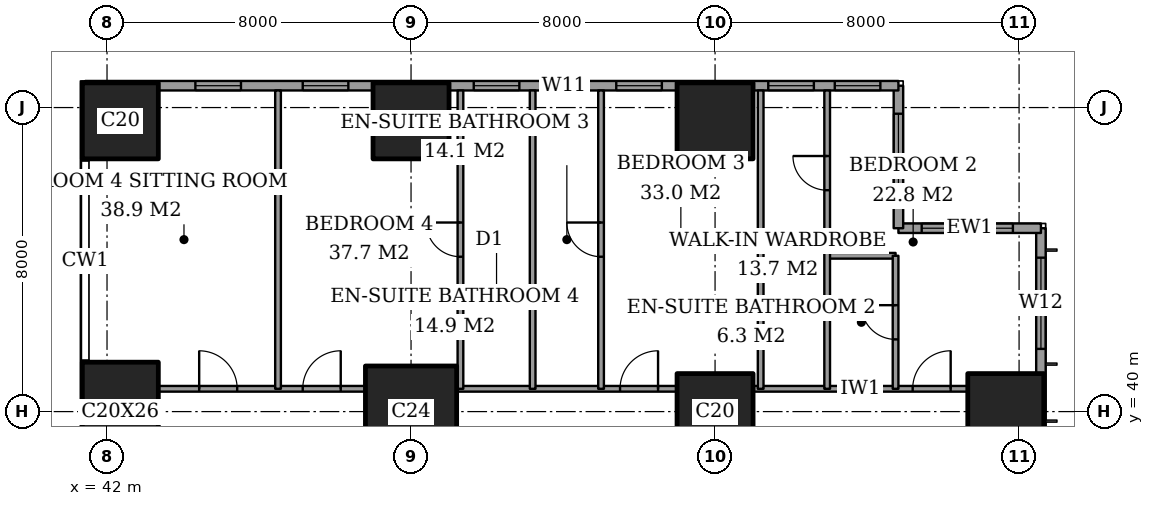
"""IFC4 building model, lengths in metres.
Left out: names, types, materials, properties, quantities, classifications, styles, units other than length and angle.
Written with IfcOpenShell. Run it as: python <this file> out.ifc"""

import sys

from ifc_helpers import new_model, si_unit, direction, frame, frame_2d, origin, origin_2d, place, context, subcontext, project, spatial, rectangle, extrude, element, fill, save


model = new_model("IFC4")
c1 = context("Model", 3, precision=1e-05, world=origin(), true_north=direction((0.0, 1.0)))
c2 = subcontext(c1, "Body", "Model", "MODEL_VIEW")
j1 = project(units=[si_unit("LENGTHUNIT", "METRE"), si_unit("PLANEANGLEUNIT", "RADIAN")], contexts=[c1])
p1 = place(None, origin())
s1 = spatial("IfcSite", under=j1, at=p1, CompositionType="ELEMENT")
p2 = place(p1, origin())
s2 = spatial("IfcBuilding", under=s1, at=p2, CompositionType="ELEMENT")
p3 = place(p2, frame((0.0, 0.0, 135.8)))
s3 = spatial("IfcBuildingStorey", under=s2, at=p3, CompositionType="ELEMENT", Elevation=135.8)
p4 = place(p3, frame((42.35, 40.0, 0.0), z_axis=(0.0, 0.0, 1.0), x_axis=(1.0, 0.0, 0.0)))
e1 = element("IfcColumn", 1, at=p4, inside=s3, PredefinedType="COLUMN", context=c2, shape_type="SweptSolid", body=[
    extrude(rectangle(XDim=2.0, YDim=2.6, at=origin_2d()), origin(), (0.0, 0.0, 1.0), 3.6),
])
p5 = place(p3, frame((42.35, 47.65, 0.0), z_axis=(0.0, 0.0, 1.0), x_axis=(1.0, 0.0, 0.0)))
e2 = element("IfcColumn", 2, at=p5, inside=s3, PredefinedType="COLUMN", context=c2, shape_type="SweptSolid", body=[
    extrude(rectangle(XDim=2.0, YDim=2.0, at=origin_2d()), origin(), (0.0, 0.0, 1.0), 3.6),
])
p6 = place(p3, frame((50.0, 40.0, 0.0), z_axis=(0.0, 0.0, 1.0), x_axis=(1.0, 0.0, 0.0)))
e3 = element("IfcColumn", 3, at=p6, inside=s3, PredefinedType="COLUMN", context=c2, shape_type="SweptSolid", body=[
    extrude(rectangle(XDim=2.4, YDim=2.4, at=origin_2d()), origin(), (0.0, 0.0, 1.0), 3.6),
])
for number, where, z_axis, x_axis in (
    (4, (50.0, 47.65, 0.0), (0.0, 0.0, 1.0), (1.0, 0.0, 0.0)),
    (5, (58.0, 40.0, 0.0), (0.0, 0.0, 1.0), (1.0, 0.0, 0.0)),
    (6, (58.0, 47.65, 0.0), (0.0, 0.0, 1.0), (1.0, 0.0, 0.0)),
    (7, (65.65, 40.0, 0.0), (0.0, 0.0, 1.0), (1.0, 0.0, 0.0)),
):
    element("IfcColumn", number, at=place(p3, frame(where, z_axis=z_axis, x_axis=x_axis)), inside=s3, PredefinedType="COLUMN", context=c2, shape_type="SweptSolid", body=[
        extrude(rectangle(XDim=2.0, YDim=2.0, at=origin_2d()), origin(), (0.0, 0.0, 1.0), 3.6),
    ])
p7 = place(p3, frame((66.575, 3.175, 0.0), z_axis=(0.0, 0.0, 1.0), x_axis=(0.0, 1.0, 0.0)))
e8 = element("IfcWall", 8, at=p7, inside=s3, PredefinedType="SOLIDWALL", context=c2, shape_type="SweptSolid", body=[
    extrude(rectangle(XDim=41.65, YDim=0.25, at=frame_2d((20.825, 0.0))), origin(), (0.0, 0.0, 1.0), 3.6),
])
p8 = place(p7, frame((0.775, 0.0, 0.4)))
e9 = element("IfcOpeningElement", 9, at=p8, cuts=e8, PredefinedType="OPENING", context=c2, shape_type="SweptSolid", body=[
    extrude(rectangle(XDim=2.4, YDim=2.2, at=frame_2d((1.2, 1.1))), frame((0.0, 0.135, 0.0), z_axis=(0.0, -1.0, 0.0), x_axis=(1.0, 0.0, 0.0)), (0.0, 0.0, 1.0), 0.27),
])
p9 = place(p7, frame((6.1, 0.0, 0.4)))
e10 = element("IfcOpeningElement", 10, at=p9, cuts=e8, PredefinedType="OPENING", context=c2, shape_type="SweptSolid", body=[
    extrude(rectangle(XDim=1.2, YDim=2.2, at=frame_2d((0.6, 1.1))), frame((0.0, 0.135, 0.0), z_axis=(0.0, -1.0, 0.0), x_axis=(1.0, 0.0, 0.0)), (0.0, 0.0, 1.0), 0.27),
])
p10 = place(p7, frame((8.275, 0.0, 0.4)))
e11 = element("IfcOpeningElement", 11, at=p10, cuts=e8, PredefinedType="OPENING", context=c2, shape_type="SweptSolid", body=[
    extrude(rectangle(XDim=2.4, YDim=2.2, at=frame_2d((1.2, 1.1))), frame((0.0, 0.135, 0.0), z_axis=(0.0, -1.0, 0.0), x_axis=(1.0, 0.0, 0.0)), (0.0, 0.0, 1.0), 0.27),
])
p11 = place(p7, frame((15.775, 0.0, 0.4)))
e12 = element("IfcOpeningElement", 12, at=p11, cuts=e8, PredefinedType="OPENING", context=c2, shape_type="SweptSolid", body=[
    extrude(rectangle(XDim=2.4, YDim=2.2, at=frame_2d((1.2, 1.1))), frame((0.0, 0.135, 0.0), z_axis=(0.0, -1.0, 0.0), x_axis=(1.0, 0.0, 0.0)), (0.0, 0.0, 1.0), 0.27),
])
p12 = place(p7, frame((23.475, 0.0, 0.4)))
e13 = element("IfcOpeningElement", 13, at=p12, cuts=e8, PredefinedType="OPENING", context=c2, shape_type="SweptSolid", body=[
    extrude(rectangle(XDim=2.4, YDim=2.2, at=frame_2d((1.2, 1.1))), frame((0.0, 0.135, 0.0), z_axis=(0.0, -1.0, 0.0), x_axis=(1.0, 0.0, 0.0)), (0.0, 0.0, 1.0), 0.27),
])
p13 = place(p7, frame((30.975, 0.0, 0.4)))
e14 = element("IfcOpeningElement", 14, at=p13, cuts=e8, PredefinedType="OPENING", context=c2, shape_type="SweptSolid", body=[
    extrude(rectangle(XDim=2.4, YDim=2.2, at=frame_2d((1.2, 1.1))), frame((0.0, 0.135, 0.0), z_axis=(0.0, -1.0, 0.0), x_axis=(1.0, 0.0, 0.0)), (0.0, 0.0, 1.0), 0.27),
])
p14 = place(p7, frame((34.5, 0.0, 0.4)))
e15 = element("IfcOpeningElement", 15, at=p14, cuts=e8, PredefinedType="OPENING", context=c2, shape_type="SweptSolid", body=[
    extrude(rectangle(XDim=1.2, YDim=2.2, at=frame_2d((0.6, 1.1))), frame((0.0, 0.135, 0.0), z_axis=(0.0, -1.0, 0.0), x_axis=(1.0, 0.0, 0.0)), (0.0, 0.0, 1.0), 0.27),
])
p15 = place(p7, frame((38.475, 0.0, 0.4)))
e16 = element("IfcOpeningElement", 16, at=p15, cuts=e8, PredefinedType="OPENING", context=c2, shape_type="SweptSolid", body=[
    extrude(rectangle(XDim=2.4, YDim=2.2, at=frame_2d((1.2, 1.1))), frame((0.0, 0.135, 0.0), z_axis=(0.0, -1.0, 0.0), x_axis=(1.0, 0.0, 0.0)), (0.0, 0.0, 1.0), 0.27),
])
p16 = place(p3, frame((66.575, 44.825, 0.0), z_axis=(0.0, 0.0, 1.0), x_axis=(-1.0, 0.0, 0.0)))
e17 = element("IfcWall", 17, at=p16, inside=s3, PredefinedType="SOLIDWALL", context=c2, shape_type="SweptSolid", body=[
    extrude(rectangle(XDim=3.75, YDim=0.25, at=frame_2d((1.875, 0.0))), origin(), (0.0, 0.0, 1.0), 3.6),
])
p17 = place(p16, frame((0.738, 0.0, 0.4)))
e18 = element("IfcOpeningElement", 18, at=p17, cuts=e17, PredefinedType="OPENING", context=c2, shape_type="SweptSolid", body=[
    extrude(rectangle(XDim=2.4, YDim=2.2, at=frame_2d((1.2, 1.1))), frame((0.0, 0.135, 0.0), z_axis=(0.0, -1.0, 0.0), x_axis=(1.0, 0.0, 0.0)), (0.0, 0.0, 1.0), 0.27),
])
p18 = place(p3, frame((62.825, 44.825, 0.0), z_axis=(0.0, 0.0, 1.0), x_axis=(0.0, 1.0, 0.0)))
e19 = element("IfcWall", 19, at=p18, inside=s3, PredefinedType="SOLIDWALL", context=c2, shape_type="SweptSolid", body=[
    extrude(rectangle(XDim=3.75, YDim=0.25, at=frame_2d((1.875, 0.0))), origin(), (0.0, 0.0, 1.0), 3.6),
])
p19 = place(p18, frame((0.613, 0.0, 0.4)))
e20 = element("IfcOpeningElement", 20, at=p19, cuts=e19, PredefinedType="OPENING", context=c2, shape_type="SweptSolid", body=[
    extrude(rectangle(XDim=2.4, YDim=2.2, at=frame_2d((1.2, 1.1))), frame((0.0, 0.135, 0.0), z_axis=(0.0, -1.0, 0.0), x_axis=(1.0, 0.0, 0.0)), (0.0, 0.0, 1.0), 0.27),
])
p20 = place(p3, frame((62.825, 48.575, 0.0), z_axis=(0.0, 0.0, 1.0), x_axis=(-1.0, 0.0, 0.0)))
e21 = element("IfcWall", 21, at=p20, inside=s3, PredefinedType="SOLIDWALL", context=c2, shape_type="SweptSolid", body=[
    extrude(rectangle(XDim=21.4, YDim=0.25, at=frame_2d((10.7, 0.0))), origin(), (0.0, 0.0, 1.0), 3.6),
])
p21 = place(p20, frame((0.475, 0.0, 0.4)))
e22 = element("IfcOpeningElement", 22, at=p21, cuts=e21, PredefinedType="OPENING", context=c2, shape_type="SweptSolid", body=[
    extrude(rectangle(XDim=1.2, YDim=2.2, at=frame_2d((0.6, 1.1))), frame((0.0, 0.135, 0.0), z_axis=(0.0, -1.0, 0.0), x_axis=(1.0, 0.0, 0.0)), (0.0, 0.0, 1.0), 0.27),
])
p22 = place(p20, frame((2.225, 0.0, 0.4)))
e23 = element("IfcOpeningElement", 23, at=p22, cuts=e21, PredefinedType="OPENING", context=c2, shape_type="SweptSolid", body=[
    extrude(rectangle(XDim=1.2, YDim=2.2, at=frame_2d((0.6, 1.1))), frame((0.0, 0.135, 0.0), z_axis=(0.0, -1.0, 0.0), x_axis=(1.0, 0.0, 0.0)), (0.0, 0.0, 1.0), 0.27),
])
p23 = place(p20, frame((6.225, 0.0, 0.4)))
e24 = element("IfcOpeningElement", 24, at=p23, cuts=e21, PredefinedType="OPENING", context=c2, shape_type="SweptSolid", body=[
    extrude(rectangle(XDim=1.2, YDim=2.2, at=frame_2d((0.6, 1.1))), frame((0.0, 0.135, 0.0), z_axis=(0.0, -1.0, 0.0), x_axis=(1.0, 0.0, 0.0)), (0.0, 0.0, 1.0), 0.27),
])
p24 = place(p20, frame((8.2, 0.0, 0.4)))
e25 = element("IfcOpeningElement", 25, at=p24, cuts=e21, PredefinedType="OPENING", context=c2, shape_type="SweptSolid", body=[
    extrude(rectangle(XDim=1.2, YDim=2.2, at=frame_2d((0.6, 1.1))), frame((0.0, 0.135, 0.0), z_axis=(0.0, -1.0, 0.0), x_axis=(1.0, 0.0, 0.0)), (0.0, 0.0, 1.0), 0.27),
])
p25 = place(p20, frame((9.975, 0.0, 0.4)))
e26 = element("IfcOpeningElement", 26, at=p25, cuts=e21, PredefinedType="OPENING", context=c2, shape_type="SweptSolid", body=[
    extrude(rectangle(XDim=1.2, YDim=2.2, at=frame_2d((0.6, 1.1))), frame((0.0, 0.135, 0.0), z_axis=(0.0, -1.0, 0.0), x_axis=(1.0, 0.0, 0.0)), (0.0, 0.0, 1.0), 0.27),
])
p26 = place(p20, frame((14.475, 0.0, 0.4)))
e27 = element("IfcOpeningElement", 27, at=p26, cuts=e21, PredefinedType="OPENING", context=c2, shape_type="SweptSolid", body=[
    extrude(rectangle(XDim=1.2, YDim=2.2, at=frame_2d((0.6, 1.1))), frame((0.0, 0.135, 0.0), z_axis=(0.0, -1.0, 0.0), x_axis=(1.0, 0.0, 0.0)), (0.0, 0.0, 1.0), 0.27),
])
p27 = place(p20, frame((17.3, 0.0, 0.4)))
e28 = element("IfcOpeningElement", 28, at=p27, cuts=e21, PredefinedType="OPENING", context=c2, shape_type="SweptSolid", body=[
    extrude(rectangle(XDim=1.2, YDim=2.2, at=frame_2d((0.6, 1.1))), frame((0.0, 0.135, 0.0), z_axis=(0.0, -1.0, 0.0), x_axis=(1.0, 0.0, 0.0)), (0.0, 0.0, 1.0), 0.27),
])
p28 = place(p3, frame((43.35, 40.6, 0.0), z_axis=(0.0, 0.0, 1.0), x_axis=(1.0, 0.0, 0.0)))
e29 = element("IfcWall", 29, at=p28, inside=s3, PredefinedType="PARTITIONING", context=c2, shape_type="SweptSolid", body=[
    extrude(rectangle(XDim=5.45, YDim=0.15, at=frame_2d((2.725, 0.0))), origin(), (0.0, 0.0, 1.0), 3.35),
])
p29 = place(p28, frame((3.8, 0.0, 0.0)))
e30 = element("IfcOpeningElement", 30, at=p29, cuts=e29, PredefinedType="OPENING", context=c2, shape_type="SweptSolid", body=[
    extrude(rectangle(XDim=1.0, YDim=2.1, at=frame_2d((0.5, 1.05))), frame((0.0, 0.085, 0.0), z_axis=(0.0, -1.0, 0.0), x_axis=(1.0, 0.0, 0.0)), (0.0, 0.0, 1.0), 0.17),
])
p30 = place(p28, frame((1.075, 0.0, 0.0)))
e31 = element("IfcOpeningElement", 31, at=p30, cuts=e29, PredefinedType="OPENING", context=c2, shape_type="SweptSolid", body=[
    extrude(rectangle(XDim=1.0, YDim=2.1, at=frame_2d((0.5, 1.05))), frame((0.0, 0.085, 0.0), z_axis=(0.0, -1.0, 0.0), x_axis=(1.0, 0.0, 0.0)), (0.0, 0.0, 1.0), 0.17),
])
p31 = place(p3, frame((51.2, 40.6, 0.0), z_axis=(0.0, 0.0, 1.0), x_axis=(1.0, 0.0, 0.0)))
e32 = element("IfcWall", 32, at=p31, inside=s3, PredefinedType="PARTITIONING", context=c2, shape_type="SweptSolid", body=[
    extrude(rectangle(XDim=5.8, YDim=0.15, at=frame_2d((2.9, 0.0))), origin(), (0.0, 0.0, 1.0), 3.35),
])
p32 = place(p31, frame((4.3, 0.0, 0.0)))
e33 = element("IfcOpeningElement", 33, at=p32, cuts=e32, PredefinedType="OPENING", context=c2, shape_type="SweptSolid", body=[
    extrude(rectangle(XDim=1.0, YDim=2.1, at=frame_2d((0.5, 1.05))), frame((0.0, 0.085, 0.0), z_axis=(0.0, -1.0, 0.0), x_axis=(1.0, 0.0, 0.0)), (0.0, 0.0, 1.0), 0.17),
])
p33 = place(p3, frame((59.0, 40.6, 0.0), z_axis=(0.0, 0.0, 1.0), x_axis=(1.0, 0.0, 0.0)))
e34 = element("IfcWall", 34, at=p33, inside=s3, PredefinedType="PARTITIONING", context=c2, shape_type="SweptSolid", body=[
    extrude(rectangle(XDim=5.65, YDim=0.15, at=frame_2d((2.825, 0.0))), origin(), (0.0, 0.0, 1.0), 3.35),
])
p34 = place(p33, frame((4.2, 0.0, 0.0)))
e35 = element("IfcOpeningElement", 35, at=p34, cuts=e34, PredefinedType="OPENING", context=c2, shape_type="SweptSolid", body=[
    extrude(rectangle(XDim=1.0, YDim=2.1, at=frame_2d((0.5, 1.05))), frame((0.0, 0.085, 0.0), z_axis=(0.0, -1.0, 0.0), x_axis=(1.0, 0.0, 0.0)), (0.0, 0.0, 1.0), 0.17),
])
p35 = place(p3, frame((60.95, 44.1, 0.0), z_axis=(0.0, 0.0, 1.0), x_axis=(1.0, 0.0, 0.0)))
e36 = element("IfcWall", 36, at=p35, inside=s3, PredefinedType="PARTITIONING", context=c2, shape_type="SweptSolid", body=[
    extrude(rectangle(XDim=1.8, YDim=0.15, at=frame_2d((0.9, 0.0))), origin(), (0.0, 0.0, 1.0), 3.35),
])
p36 = place(p3, frame((46.5, 40.6, 0.0), z_axis=(0.0, 0.0, 1.0), x_axis=(0.0, 1.0, 0.0)))
e37 = element("IfcWall", 37, at=p36, inside=s3, PredefinedType="PARTITIONING", context=c2, shape_type="SweptSolid", body=[
    extrude(rectangle(XDim=7.85, YDim=0.15, at=frame_2d((3.925, 0.0))), origin(), (0.0, 0.0, 1.0), 3.35),
])
p37 = place(p3, frame((51.3, 40.6, 0.0), z_axis=(0.0, 0.0, 1.0), x_axis=(0.0, 1.0, 0.0)))
e38 = element("IfcWall", 38, at=p37, inside=s3, PredefinedType="PARTITIONING", context=c2, shape_type="SweptSolid", body=[
    extrude(rectangle(XDim=7.85, YDim=0.15, at=frame_2d((3.925, 0.0))), origin(), (0.0, 0.0, 1.0), 3.35),
])
p38 = place(p37, frame((3.475, 0.0, 0.0)))
e39 = element("IfcOpeningElement", 39, at=p38, cuts=e38, PredefinedType="OPENING", context=c2, shape_type="SweptSolid", body=[
    extrude(rectangle(XDim=0.9, YDim=2.1, at=frame_2d((0.45, 1.05))), frame((0.0, 0.085, 0.0), z_axis=(0.0, -1.0, 0.0), x_axis=(1.0, 0.0, 0.0)), (0.0, 0.0, 1.0), 0.17),
])
p39 = place(p3, frame((53.2, 40.6, 0.0), z_axis=(0.0, 0.0, 1.0), x_axis=(0.0, 1.0, 0.0)))
e40 = element("IfcWall", 40, at=p39, inside=s3, PredefinedType="PARTITIONING", context=c2, shape_type="SweptSolid", body=[
    extrude(rectangle(XDim=7.85, YDim=0.15, at=frame_2d((3.925, 0.0))), origin(), (0.0, 0.0, 1.0), 3.35),
])
p40 = place(p3, frame((55.0, 40.6, 0.0), z_axis=(0.0, 0.0, 1.0), x_axis=(0.0, 1.0, 0.0)))
e41 = element("IfcWall", 41, at=p40, inside=s3, PredefinedType="PARTITIONING", context=c2, shape_type="SweptSolid", body=[
    extrude(rectangle(XDim=7.85, YDim=0.15, at=frame_2d((3.925, 0.0))), origin(), (0.0, 0.0, 1.0), 3.35),
])
p41 = place(p40, frame((3.475, 0.0, 0.0)))
e42 = element("IfcOpeningElement", 42, at=p41, cuts=e41, PredefinedType="OPENING", context=c2, shape_type="SweptSolid", body=[
    extrude(rectangle(XDim=0.9, YDim=2.1, at=frame_2d((0.45, 1.05))), frame((0.0, 0.085, 0.0), z_axis=(0.0, -1.0, 0.0), x_axis=(1.0, 0.0, 0.0)), (0.0, 0.0, 1.0), 0.17),
])
p42 = place(p3, frame((59.2, 40.6, 0.0), z_axis=(0.0, 0.0, 1.0), x_axis=(0.0, 1.0, 0.0)))
e43 = element("IfcWall", 43, at=p42, inside=s3, PredefinedType="PARTITIONING", context=c2, shape_type="SweptSolid", body=[
    extrude(rectangle(XDim=7.85, YDim=0.15, at=frame_2d((3.925, 0.0))), origin(), (0.0, 0.0, 1.0), 3.35),
])
p43 = place(p3, frame((60.95, 40.6, 0.0), z_axis=(0.0, 0.0, 1.0), x_axis=(0.0, 1.0, 0.0)))
e44 = element("IfcWall", 44, at=p43, inside=s3, PredefinedType="PARTITIONING", context=c2, shape_type="SweptSolid", body=[
    extrude(rectangle(XDim=7.85, YDim=0.15, at=frame_2d((3.925, 0.0))), origin(), (0.0, 0.0, 1.0), 3.35),
])
p44 = place(p43, frame((5.225, 0.0, 0.0)))
e45 = element("IfcOpeningElement", 45, at=p44, cuts=e44, PredefinedType="OPENING", context=c2, shape_type="SweptSolid", body=[
    extrude(rectangle(XDim=0.9, YDim=2.1, at=frame_2d((0.45, 1.05))), frame((0.0, 0.085, 0.0), z_axis=(0.0, -1.0, 0.0), x_axis=(1.0, 0.0, 0.0)), (0.0, 0.0, 1.0), 0.17),
])
p45 = place(p3, frame((62.75, 40.6, 0.0), z_axis=(0.0, 0.0, 1.0), x_axis=(0.0, 1.0, 0.0)))
e46 = element("IfcWall", 46, at=p45, inside=s3, PredefinedType="PARTITIONING", context=c2, shape_type="SweptSolid", body=[
    extrude(rectangle(XDim=3.5, YDim=0.15, at=frame_2d((1.75, 0.0))), origin(), (0.0, 0.0, 1.0), 3.35),
])
p46 = place(p45, frame((1.3, 0.0, 0.0)))
e47 = element("IfcOpeningElement", 47, at=p46, cuts=e46, PredefinedType="OPENING", context=c2, shape_type="SweptSolid", body=[
    extrude(rectangle(XDim=0.9, YDim=2.1, at=frame_2d((0.45, 1.05))), frame((0.0, 0.085, 0.0), z_axis=(0.0, -1.0, 0.0), x_axis=(1.0, 0.0, 0.0)), (0.0, 0.0, 1.0), 0.17),
])
p47 = place(p15, origin())
e48 = element("IfcWindow", 48, at=p47, inside=s3, PartitioningType="SINGLE_PANEL", PredefinedType="WINDOW", context=c2, shape_type="SweptSolid", body=[
    extrude(rectangle(XDim=2.4, YDim=2.2, at=frame_2d((1.2, 1.1))), frame((0.0, 0.03, 0.0), z_axis=(0.0, -1.0, 0.0), x_axis=(1.0, 0.0, 0.0)), (0.0, 0.0, 1.0), 0.06),
])
fill(e16, e48)
p48 = place(p17, origin())
e49 = element("IfcWindow", 49, at=p48, inside=s3, PartitioningType="SINGLE_PANEL", PredefinedType="WINDOW", context=c2, shape_type="SweptSolid", body=[
    extrude(rectangle(XDim=2.4, YDim=2.2, at=frame_2d((1.2, 1.1))), frame((0.0, 0.03, 0.0), z_axis=(0.0, -1.0, 0.0), x_axis=(1.0, 0.0, 0.0)), (0.0, 0.0, 1.0), 0.06),
])
fill(e18, e49)
p49 = place(p19, origin())
e50 = element("IfcWindow", 50, at=p49, inside=s3, PartitioningType="SINGLE_PANEL", PredefinedType="WINDOW", context=c2, shape_type="SweptSolid", body=[
    extrude(rectangle(XDim=2.4, YDim=2.2, at=frame_2d((1.2, 1.1))), frame((0.0, 0.03, 0.0), z_axis=(0.0, -1.0, 0.0), x_axis=(1.0, 0.0, 0.0)), (0.0, 0.0, 1.0), 0.06),
])
fill(e20, e50)
p50 = place(p21, origin())
e51 = element("IfcWindow", 51, at=p50, inside=s3, PartitioningType="SINGLE_PANEL", PredefinedType="WINDOW", context=c2, shape_type="SweptSolid", body=[
    extrude(rectangle(XDim=1.2, YDim=2.2, at=frame_2d((0.6, 1.1))), frame((0.0, 0.03, 0.0), z_axis=(0.0, -1.0, 0.0), x_axis=(1.0, 0.0, 0.0)), (0.0, 0.0, 1.0), 0.06),
])
fill(e22, e51)
p51 = place(p22, origin())
e52 = element("IfcWindow", 52, at=p51, inside=s3, PartitioningType="SINGLE_PANEL", PredefinedType="WINDOW", context=c2, shape_type="SweptSolid", body=[
    extrude(rectangle(XDim=1.2, YDim=2.2, at=frame_2d((0.6, 1.1))), frame((0.0, 0.03, 0.0), z_axis=(0.0, -1.0, 0.0), x_axis=(1.0, 0.0, 0.0)), (0.0, 0.0, 1.0), 0.06),
])
fill(e23, e52)
p52 = place(p23, origin())
e53 = element("IfcWindow", 53, at=p52, inside=s3, PartitioningType="SINGLE_PANEL", PredefinedType="WINDOW", context=c2, shape_type="SweptSolid", body=[
    extrude(rectangle(XDim=1.2, YDim=2.2, at=frame_2d((0.6, 1.1))), frame((0.0, 0.03, 0.0), z_axis=(0.0, -1.0, 0.0), x_axis=(1.0, 0.0, 0.0)), (0.0, 0.0, 1.0), 0.06),
])
fill(e24, e53)
p53 = place(p24, origin())
e54 = element("IfcWindow", 54, at=p53, inside=s3, PartitioningType="SINGLE_PANEL", PredefinedType="WINDOW", context=c2, shape_type="SweptSolid", body=[
    extrude(rectangle(XDim=1.2, YDim=2.2, at=frame_2d((0.6, 1.1))), frame((0.0, 0.03, 0.0), z_axis=(0.0, -1.0, 0.0), x_axis=(1.0, 0.0, 0.0)), (0.0, 0.0, 1.0), 0.06),
])
fill(e25, e54)
p54 = place(p25, origin())
e55 = element("IfcWindow", 55, at=p54, inside=s3, PartitioningType="SINGLE_PANEL", PredefinedType="WINDOW", context=c2, shape_type="SweptSolid", body=[
    extrude(rectangle(XDim=1.2, YDim=2.2, at=frame_2d((0.6, 1.1))), frame((0.0, 0.03, 0.0), z_axis=(0.0, -1.0, 0.0), x_axis=(1.0, 0.0, 0.0)), (0.0, 0.0, 1.0), 0.06),
])
fill(e26, e55)
p55 = place(p26, origin())
e56 = element("IfcWindow", 56, at=p55, inside=s3, PartitioningType="SINGLE_PANEL", PredefinedType="WINDOW", context=c2, shape_type="SweptSolid", body=[
    extrude(rectangle(XDim=1.2, YDim=2.2, at=frame_2d((0.6, 1.1))), frame((0.0, 0.03, 0.0), z_axis=(0.0, -1.0, 0.0), x_axis=(1.0, 0.0, 0.0)), (0.0, 0.0, 1.0), 0.06),
])
fill(e27, e56)
p56 = place(p27, origin())
e57 = element("IfcWindow", 57, at=p56, inside=s3, PartitioningType="SINGLE_PANEL", PredefinedType="WINDOW", context=c2, shape_type="SweptSolid", body=[
    extrude(rectangle(XDim=1.2, YDim=2.2, at=frame_2d((0.6, 1.1))), frame((0.0, 0.03, 0.0), z_axis=(0.0, -1.0, 0.0), x_axis=(1.0, 0.0, 0.0)), (0.0, 0.0, 1.0), 0.06),
])
fill(e28, e57)
p57 = place(p46, origin())
e58 = element("IfcDoor", 58, at=p57, inside=s3, OperationType="SINGLE_SWING_LEFT", PredefinedType="DOOR", context=c2, shape_type="SweptSolid", body=[
    extrude(rectangle(XDim=0.9, YDim=2.1, at=frame_2d((0.45, 1.05))), frame((0.0, 0.025, 0.0), z_axis=(0.0, -1.0, 0.0), x_axis=(1.0, 0.0, 0.0)), (0.0, 0.0, 1.0), 0.05),
])
fill(e47, e58)
p58 = place(p34, origin())
e59 = element("IfcDoor", 59, at=p58, inside=s3, OperationType="SINGLE_SWING_LEFT", PredefinedType="DOOR", context=c2, shape_type="SweptSolid", body=[
    extrude(rectangle(XDim=1.0, YDim=2.1, at=frame_2d((0.5, 1.05))), frame((0.0, 0.025, 0.0), z_axis=(0.0, -1.0, 0.0), x_axis=(1.0, 0.0, 0.0)), (0.0, 0.0, 1.0), 0.05),
])
fill(e35, e59)
p59 = place(p44, origin())
e60 = element("IfcDoor", 60, at=p59, inside=s3, OperationType="SINGLE_SWING_LEFT", PredefinedType="DOOR", context=c2, shape_type="SweptSolid", body=[
    extrude(rectangle(XDim=0.9, YDim=2.1, at=frame_2d((0.45, 1.05))), frame((0.0, 0.025, 0.0), z_axis=(0.0, -1.0, 0.0), x_axis=(1.0, 0.0, 0.0)), (0.0, 0.0, 1.0), 0.05),
])
fill(e45, e60)
p60 = place(p32, origin())
e61 = element("IfcDoor", 61, at=p60, inside=s3, OperationType="SINGLE_SWING_LEFT", PredefinedType="DOOR", context=c2, shape_type="SweptSolid", body=[
    extrude(rectangle(XDim=1.0, YDim=2.1, at=frame_2d((0.5, 1.05))), frame((0.0, 0.025, 0.0), z_axis=(0.0, -1.0, 0.0), x_axis=(1.0, 0.0, 0.0)), (0.0, 0.0, 1.0), 0.05),
])
fill(e33, e61)
p61 = place(p41, origin())
e62 = element("IfcDoor", 62, at=p61, inside=s3, OperationType="SINGLE_SWING_LEFT", PredefinedType="DOOR", context=c2, shape_type="SweptSolid", body=[
    extrude(rectangle(XDim=0.9, YDim=2.1, at=frame_2d((0.45, 1.05))), frame((0.0, 0.025, 0.0), z_axis=(0.0, -1.0, 0.0), x_axis=(1.0, 0.0, 0.0)), (0.0, 0.0, 1.0), 0.05),
])
fill(e42, e62)
p62 = place(p38, origin())
e63 = element("IfcDoor", 63, at=p62, inside=s3, OperationType="SINGLE_SWING_LEFT", PredefinedType="DOOR", context=c2, shape_type="SweptSolid", body=[
    extrude(rectangle(XDim=0.9, YDim=2.1, at=frame_2d((0.45, 1.05))), frame((0.0, 0.025, 0.0), z_axis=(0.0, -1.0, 0.0), x_axis=(1.0, 0.0, 0.0)), (0.0, 0.0, 1.0), 0.05),
])
fill(e39, e63)
p63 = place(p29, origin())
e64 = element("IfcDoor", 64, at=p63, inside=s3, OperationType="SINGLE_SWING_LEFT", PredefinedType="DOOR", context=c2, shape_type="SweptSolid", body=[
    extrude(rectangle(XDim=1.0, YDim=2.1, at=frame_2d((0.5, 1.05))), frame((0.0, 0.025, 0.0), z_axis=(0.0, -1.0, 0.0), x_axis=(1.0, 0.0, 0.0)), (0.0, 0.0, 1.0), 0.05),
])
fill(e30, e64)
p64 = place(p30, origin())
e65 = element("IfcDoor", 65, at=p64, inside=s3, OperationType="SINGLE_SWING_RIGHT", PredefinedType="DOOR", context=c2, shape_type="SweptSolid", body=[
    extrude(rectangle(XDim=1.0, YDim=2.1, at=frame_2d((0.5, 1.05))), frame((0.0, 0.025, 0.0), z_axis=(0.0, -1.0, 0.0), x_axis=(1.0, 0.0, 0.0)), (0.0, 0.0, 1.0), 0.05),
])
fill(e31, e65)
save(model, sys.argv[1])
